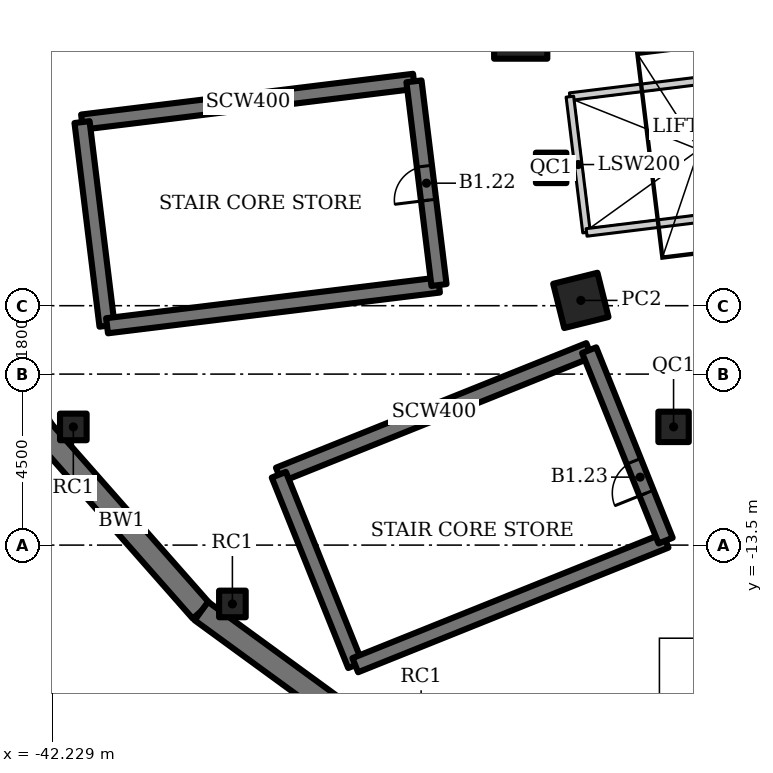
"""IFC4 building model, lengths in metres.
Left out: names, types, materials, properties, quantities, classifications, styles, units other than length and angle.
Written with IfcOpenShell. Run it as: python <this file> out.ifc"""

import sys

from ifc_helpers import new_model, si_unit, direction, frame, frame_2d, origin, origin_2d, place, context, subcontext, project, spatial, rectangle, hollow_rectangle, extrude, element, fill, save


model = new_model("IFC4")
c1 = context("Model", 3, precision=1e-05, world=origin(), true_north=direction((0.0, 1.0)))
c2 = subcontext(c1, "Body", "Model", "MODEL_VIEW")
j1 = project(units=[si_unit("LENGTHUNIT", "METRE"), si_unit("PLANEANGLEUNIT", "RADIAN")], contexts=[c1])
p1 = place(None, origin())
s1 = spatial("IfcSite", under=j1, at=p1, CompositionType="ELEMENT")
p2 = place(p1, origin())
s2 = spatial("IfcBuilding", under=s1, at=p2, CompositionType="ELEMENT")
p3 = place(p2, frame((0.0, 0.0, -5.5)))
s3 = spatial("IfcBuildingStorey", under=s2, at=p3, CompositionType="ELEMENT", Elevation=-5.5)
p4 = place(p3, frame((-29.9, 0.0, 0.0), z_axis=(0.0, 0.0, 1.0), x_axis=(1.0, 0.0, 0.0)))
e1 = element("IfcColumn", 1, at=p4, inside=s3, PredefinedType="COLUMN", context=c2, shape_type="SweptSolid", body=[
    extrude(hollow_rectangle(XDim=1.4, YDim=1.4, WallThickness=0.1, at=origin_2d()), origin(), (0.0, 0.0, 1.0), 5.5),
])
p5 = place(p3, frame((-28.318, -7.06, 0.0), z_axis=(0.0, 0.0, 1.0), x_axis=(0.970295726276, 0.2419218956, 0.0)))
e2 = element("IfcColumn", 2, at=p5, inside=s3, PredefinedType="COLUMN", context=c2, shape_type="SweptSolid", body=[
    extrude(hollow_rectangle(XDim=1.2, YDim=1.2, WallThickness=0.1, at=origin_2d()), origin(), (0.0, 0.0, 1.0), 5.5),
])
for number, where, z_axis, x_axis in (
    (3, (-29.099, -3.573, 0.0), (0.0, 0.0, 1.0), (1.0, 0.0, 0.0)),
    (4, (-25.878, -10.388, 0.0), (0.0, 0.0, 1.0), (1.0, 0.0, 0.0)),
):
    element("IfcColumn", number, at=place(p3, frame(where, z_axis=z_axis, x_axis=x_axis)), inside=s3, PredefinedType="COLUMN", context=c2, shape_type="SweptSolid", body=[
        extrude(hollow_rectangle(XDim=0.8, YDim=0.8, WallThickness=0.05, at=origin_2d()), origin(), (0.0, 0.0, 1.0), 5.5),
    ])
for number, where, z_axis, x_axis in (
    (5, (-37.487, -15.049, 0.0), (0.0, 0.0, 1.0), (1.0, 0.0, 0.0)),
    (6, (-41.672, -10.39, 0.0), (0.0, 0.0, 1.0), (1.0, 0.0, 0.0)),
):
    element("IfcColumn", number, at=place(p3, frame(where, z_axis=z_axis, x_axis=x_axis)), inside=s3, PredefinedType="COLUMN", context=c2, shape_type="SweptSolid", body=[
        extrude(hollow_rectangle(XDim=0.7, YDim=0.7, WallThickness=0.04, at=origin_2d()), origin(), (0.0, 0.0, 1.0), 5.5),
    ])
p6 = place(p3, frame((-42.494, -10.482, 0.0), z_axis=(0.0, 0.0, 1.0), x_axis=(0.66120355744, -0.75020654198, 0.0)))
e7 = element("IfcWall", 7, at=p6, inside=s3, PredefinedType="SOLIDWALL", context=c2, shape_type="SweptSolid", body=[
    extrude(rectangle(XDim=6.336, YDim=0.6, at=frame_2d((3.168, 0.0))), origin(), (0.0, 0.0, 1.0), 5.5),
])
p7 = place(p3, frame((-38.304, -15.235, 0.0), z_axis=(0.0, 0.0, 1.0), x_axis=(0.807901048768, -0.589318161437, 0.0)))
e8 = element("IfcWall", 8, at=p7, inside=s3, PredefinedType="SOLIDWALL", context=c2, shape_type="SweptSolid", body=[
    extrude(rectangle(XDim=6.163, YDim=0.6, at=frame_2d((3.082, 0.0))), origin(), (0.0, 0.0, 1.0), 5.5),
])
p8 = place(p3, frame((-32.708, -1.296, 0.0), z_axis=(0.0, 0.0, 1.0), x_axis=(-0.992545692684, -0.121873081252, 0.0)))
e9 = element("IfcWall", 9, at=p8, inside=s3, PredefinedType="SHEAR", context=c2, shape_type="SweptSolid", body=[
    extrude(rectangle(XDim=8.8, YDim=0.4, at=frame_2d((4.4, 0.0))), origin(), (0.0, 0.0, 1.0), 5.5),
])
p9 = place(p3, frame((-41.443, -2.368, 0.0), z_axis=(0.0, 0.0, 1.0), x_axis=(0.121892082937, -0.992543359314, 0.0)))
e10 = element("IfcWall", 10, at=p9, inside=s3, PredefinedType="SHEAR", context=c2, shape_type="SweptSolid", body=[
    extrude(rectangle(XDim=5.4, YDim=0.4, at=frame_2d((2.7, 0.0))), origin(), (0.0, 0.0, 1.0), 5.5),
])
p10 = place(p3, frame((-40.785, -7.728, 0.0), z_axis=(0.0, 0.0, 1.0), x_axis=(0.992545280606, 0.121876437212, 0.0)))
e11 = element("IfcWall", 11, at=p10, inside=s3, PredefinedType="SHEAR", context=c2, shape_type="SweptSolid", body=[
    extrude(rectangle(XDim=8.8, YDim=0.4, at=frame_2d((4.4, 0.0))), origin(), (0.0, 0.0, 1.0), 5.5),
])
p11 = place(p3, frame((-32.051, -6.656, 0.0), z_axis=(0.0, 0.0, 1.0), x_axis=(-0.12184754212, 0.99254882826, 0.0)))
e12 = element("IfcWall", 12, at=p11, inside=s3, PredefinedType="SHEAR", context=c2, shape_type="SweptSolid", body=[
    extrude(rectangle(XDim=5.4, YDim=0.4, at=frame_2d((2.7, 0.0))), origin(), (0.0, 0.0, 1.0), 5.5),
])
p12 = place(p11, frame((2.25, 0.0, 0.0)))
e13 = element("IfcOpeningElement", 13, at=p12, cuts=e12, PredefinedType="OPENING", context=c2, shape_type="SweptSolid", body=[
    extrude(rectangle(XDim=0.9, YDim=2.1, at=frame_2d((0.45, 1.05))), frame((0.0, 0.21, 0.0), z_axis=(0.0, -1.0, 0.0), x_axis=(1.0, 0.0, 0.0)), (0.0, 0.0, 1.0), 0.42),
])
p13 = place(p3, frame((-28.099, -8.371, 0.0), z_axis=(0.0, 0.0, 1.0), x_axis=(-0.92801678004, -0.372538395288, 0.0)))
e14 = element("IfcWall", 14, at=p13, inside=s3, PredefinedType="SHEAR", context=c2, shape_type="SweptSolid", body=[
    extrude(rectangle(XDim=8.8, YDim=0.4, at=frame_2d((4.4, 0.0))), origin(), (0.0, 0.0, 1.0), 5.5),
])
p14 = place(p3, frame((-36.265, -11.649, 0.0), z_axis=(0.0, 0.0, 1.0), x_axis=(0.372544066459, -0.928014503414, 0.0)))
e15 = element("IfcWall", 15, at=p14, inside=s3, PredefinedType="SHEAR", context=c2, shape_type="SweptSolid", body=[
    extrude(rectangle(XDim=5.4, YDim=0.4, at=frame_2d((2.7, 0.0))), origin(), (0.0, 0.0, 1.0), 5.5),
])
p15 = place(p3, frame((-34.253, -16.66, 0.0), z_axis=(0.0, 0.0, 1.0), x_axis=(0.92801678004, 0.372538395288, 0.0)))
e16 = element("IfcWall", 16, at=p15, inside=s3, PredefinedType="SHEAR", context=c2, shape_type="SweptSolid", body=[
    extrude(rectangle(XDim=8.8, YDim=0.4, at=frame_2d((4.4, 0.0))), origin(), (0.0, 0.0, 1.0), 5.5),
])
p16 = place(p3, frame((-26.087, -13.382, 0.0), z_axis=(0.0, 0.0, 1.0), x_axis=(-0.372544066459, 0.928014503414, 0.0)))
e17 = element("IfcWall", 17, at=p16, inside=s3, PredefinedType="SHEAR", context=c2, shape_type="SweptSolid", body=[
    extrude(rectangle(XDim=5.4, YDim=0.4, at=frame_2d((2.7, 0.0))), origin(), (0.0, 0.0, 1.0), 5.5),
])
p17 = place(p16, frame((1.35, 0.0, 0.0)))
e18 = element("IfcOpeningElement", 18, at=p17, cuts=e17, PredefinedType="OPENING", context=c2, shape_type="SweptSolid", body=[
    extrude(rectangle(XDim=0.9, YDim=2.1, at=frame_2d((0.45, 1.05))), frame((0.0, 0.21, 0.0), z_axis=(0.0, -1.0, 0.0), x_axis=(1.0, 0.0, 0.0)), (0.0, 0.0, 1.0), 0.42),
])
p18 = place(p3, frame((-22.254, -0.919, 0.0), z_axis=(0.0, 0.0, 1.0), x_axis=(-0.992544912608, -0.121879434097, 0.0)))
e19 = element("IfcWall", 19, at=p18, inside=s3, PredefinedType="SOLIDWALL", context=c2, shape_type="SweptSolid", body=[
    extrude(rectangle(XDim=6.4, YDim=0.2, at=frame_2d((3.2, 0.0))), origin(), (0.0, 0.0, 1.0), 5.05),
])
p19 = place(p3, frame((-28.606, -1.699, 0.0), z_axis=(0.0, 0.0, 1.0), x_axis=(0.121872547154, -0.992545758265, 0.0)))
e20 = element("IfcWall", 20, at=p19, inside=s3, PredefinedType="SOLIDWALL", context=c2, shape_type="SweptSolid", body=[
    extrude(rectangle(XDim=3.6, YDim=0.2, at=frame_2d((1.8, 0.0))), origin(), (0.0, 0.0, 1.0), 5.05),
])
p20 = place(p3, frame((-28.167, -5.272, 0.0), z_axis=(0.0, 0.0, 1.0), x_axis=(0.992549526583, 0.121841853565, 0.0)))
e21 = element("IfcWall", 21, at=p20, inside=s3, PredefinedType="SOLIDWALL", context=c2, shape_type="SweptSolid", body=[
    extrude(rectangle(XDim=6.4, YDim=0.2, at=frame_2d((3.2, 0.0))), origin(), (0.0, 0.0, 1.0), 5.05),
])
p21 = place(p12, origin())
e22 = element("IfcDoor", 22, at=p21, inside=s3, OperationType="SINGLE_SWING_LEFT", PredefinedType="DOOR", context=c2, shape_type="SweptSolid", body=[
    extrude(rectangle(XDim=0.9, YDim=2.1, at=frame_2d((0.45, 1.05))), frame((0.0, 0.025, 0.0), z_axis=(0.0, -1.0, 0.0), x_axis=(1.0, 0.0, 0.0)), (0.0, 0.0, 1.0), 0.05),
])
fill(e13, e22)
p22 = place(p17, origin())
e23 = element("IfcDoor", 23, at=p22, inside=s3, OperationType="SINGLE_SWING_LEFT", PredefinedType="DOOR", context=c2, shape_type="SweptSolid", body=[
    extrude(rectangle(XDim=0.9, YDim=2.1, at=frame_2d((0.45, 1.05))), frame((0.0, 0.025, 0.0), z_axis=(0.0, -1.0, 0.0), x_axis=(1.0, 0.0, 0.0)), (0.0, 0.0, 1.0), 0.05),
])
fill(e18, e23)
save(model, sys.argv[1])
